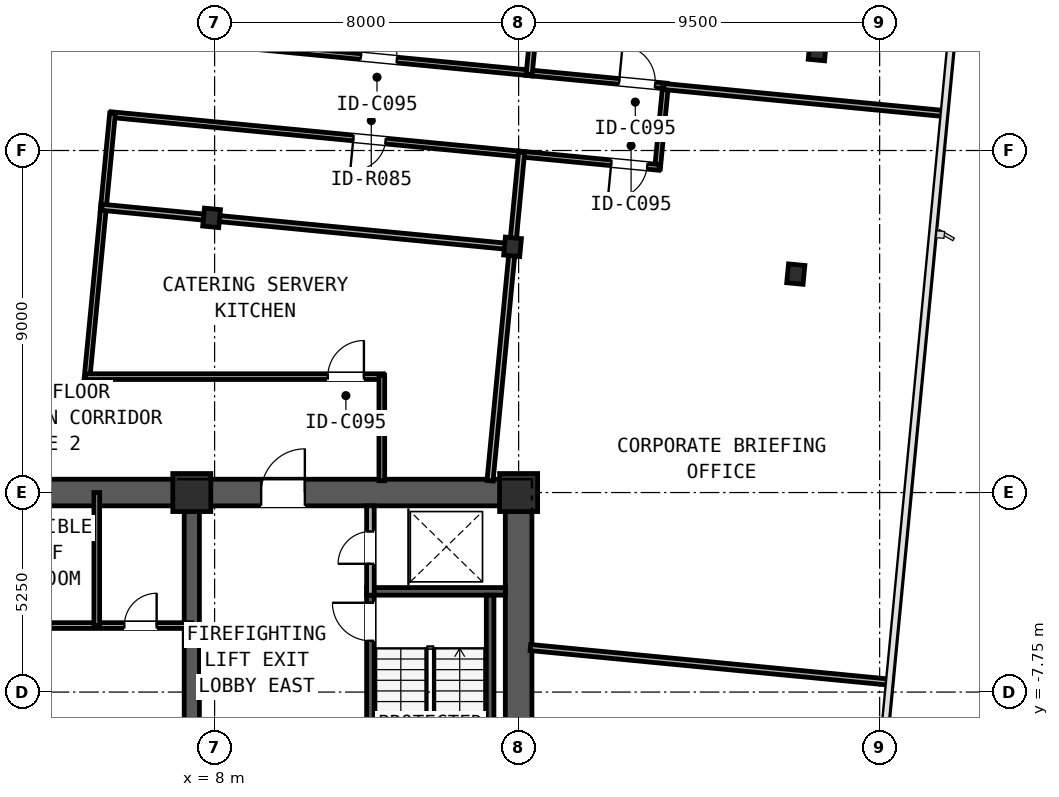
"""IFC4 building model, lengths in metres.
Left out: names, types, materials, properties, quantities, classifications, styles, units other than length and angle.
Written with IfcOpenShell. Run it as: python <this file> out.ifc"""

import sys

from ifc_helpers import new_model, si_unit, direction, frame, frame_2d, origin, origin_2d, place, context, subcontext, project, spatial, rectangle, i_section, extrude, element, fill, save


model = new_model("IFC4")
c1 = context("Model", 3, precision=1e-05, world=origin(), true_north=direction((0.0, 1.0)))
c2 = subcontext(c1, "Body", "Model", "MODEL_VIEW")
j1 = project(units=[si_unit("LENGTHUNIT", "METRE"), si_unit("PLANEANGLEUNIT", "RADIAN")], contexts=[c1])
p1 = place(None, origin())
s1 = spatial("IfcSite", under=j1, at=p1, CompositionType="ELEMENT")
p2 = place(p1, origin())
s2 = spatial("IfcBuilding", under=s1, at=p2, CompositionType="ELEMENT")
p3 = place(p2, frame((0.0, 0.0, 166.95)))
s3 = spatial("IfcBuildingStorey", under=s2, at=p3, CompositionType="ELEMENT", Elevation=166.95)
p4 = place(p3, frame((-16.35, -2.5, 0.0), z_axis=(0.0, 0.0, 1.0), x_axis=(1.0, 0.0, 0.0)))
e1 = element("IfcWall", 1, at=p4, inside=s3, PredefinedType="SHEAR", context=c2, shape_type="SweptSolid", body=[
    extrude(rectangle(XDim=32.7, YDim=0.7, at=frame_2d((16.35, 0.0))), origin(), (0.0, 0.0, 1.0), 2.91),
])
p5 = place(p4, frame((5.975, 0.0, 0.0)))
e2 = element("IfcOpeningElement", 2, at=p5, cuts=e1, PredefinedType="OPENING", context=c2, shape_type="SweptSolid", body=[
    extrude(rectangle(XDim=1.15, YDim=2.0, at=frame_2d((0.575, 1.0))), frame((0.0, 0.36, 0.0), z_axis=(0.0, -1.0, 0.0), x_axis=(1.0, 0.0, 0.0)), (0.0, 0.0, 1.0), 0.72),
])
p6 = place(p4, frame((15.55, 0.0, 0.0)))
e3 = element("IfcOpeningElement", 3, at=p6, cuts=e1, PredefinedType="OPENING", context=c2, shape_type="SweptSolid", body=[
    extrude(rectangle(XDim=1.6, YDim=2.0, at=frame_2d((0.8, 1.0))), frame((0.0, 0.36, 0.0), z_axis=(0.0, -1.0, 0.0), x_axis=(1.0, 0.0, 0.0)), (0.0, 0.0, 1.0), 0.72),
])
p7 = place(p4, frame((25.575, 0.0, 0.0)))
e4 = element("IfcOpeningElement", 4, at=p7, cuts=e1, PredefinedType="OPENING", context=c2, shape_type="SweptSolid", body=[
    extrude(rectangle(XDim=1.15, YDim=2.0, at=frame_2d((0.575, 1.0))), frame((0.0, 0.36, 0.0), z_axis=(0.0, -1.0, 0.0), x_axis=(1.0, 0.0, 0.0)), (0.0, 0.0, 1.0), 0.72),
])
p8 = place(p3, frame((16.0, -12.65, 0.0), z_axis=(0.0, 0.0, 1.0), x_axis=(0.0, 1.0, 0.0)))
e5 = element("IfcWall", 5, at=p8, inside=s3, PredefinedType="SHEAR", context=c2, shape_type="SweptSolid", body=[
    extrude(rectangle(XDim=9.8, YDim=0.7, at=frame_2d((4.9, 0.0))), origin(), (0.0, 0.0, 1.0), 2.91),
])
p9 = place(p3, frame((7.4, -12.65, 0.0), z_axis=(0.0, 0.0, 1.0), x_axis=(0.0, 1.0, 0.0)))
e6 = element("IfcWall", 6, at=p9, inside=s3, PredefinedType="SHEAR", context=c2, shape_type="SweptSolid", body=[
    extrude(rectangle(XDim=9.8, YDim=0.4, at=frame_2d((4.9, 0.0))), origin(), (0.0, 0.0, 1.0), 3.19),
])
p10 = place(p3, frame((12.0, -5.1, 0.0), z_axis=(0.0, 0.0, 1.0), x_axis=(1.0, 0.0, 0.0)))
e7 = element("IfcWall", 7, at=p10, inside=s3, PredefinedType="SOLIDWALL", context=c2, shape_type="SweptSolid", body=[
    extrude(rectangle(XDim=3.65, YDim=0.2, at=frame_2d((1.825, 0.0))), origin(), (0.0, 0.0, 1.0), 3.19),
])
p11 = place(p3, frame((12.1, -12.2, 0.0), z_axis=(0.0, 0.0, 1.0), x_axis=(0.0, 1.0, 0.0)))
e8 = element("IfcWall", 8, at=p11, inside=s3, PredefinedType="SOLIDWALL", context=c2, shape_type="SweptSolid", body=[
    extrude(rectangle(XDim=7.0, YDim=0.2, at=frame_2d((3.5, 0.0))), origin(), (0.0, 0.0, 1.0), 3.19),
])
p12 = place(p11, frame((5.8, 0.0, 0.0)))
e9 = element("IfcOpeningElement", 9, at=p12, cuts=e8, PredefinedType="OPENING", context=c2, shape_type="SweptSolid", body=[
    extrude(rectangle(XDim=1.0, YDim=2.1, at=frame_2d((0.5, 1.05))), frame((0.0, 0.11, 0.0), z_axis=(0.0, -1.0, 0.0), x_axis=(1.0, 0.0, 0.0)), (0.0, 0.0, 1.0), 0.22),
])
p13 = place(p3, frame((15.25, -12.2, 0.0), z_axis=(0.0, 0.0, 1.0), x_axis=(0.0, 1.0, 0.0)))
e10 = element("IfcWall", 10, at=p13, inside=s3, PredefinedType="SOLIDWALL", context=c2, shape_type="SweptSolid", body=[
    extrude(rectangle(XDim=7.0, YDim=0.2, at=frame_2d((3.5, 0.0))), origin(), (0.0, 0.0, 1.0), 3.19),
])
for number, where, z_axis, x_axis in (
    (11, (7.4, -2.5, 0.0), (0.0, 0.0, 1.0), (1.0, 0.0, 0.0)),
    (12, (16.0, -2.5, 0.0), (0.0, 0.0, 1.0), (1.0, 0.0, 0.0)),
):
    element("IfcColumn", number, at=place(p3, frame(where, z_axis=z_axis, x_axis=x_axis)), inside=s3, PredefinedType="COLUMN", context=c2, shape_type="SweptSolid", body=[
        extrude(rectangle(XDim=1.0, YDim=1.0, at=origin_2d()), origin(), (0.0, 0.0, 1.0), 3.45),
    ])
for number, where, z_axis, x_axis in (
    (13, (7.921, 4.728, 0.0), (0.0, 0.0, 1.0), (0.995, -0.096, 0.0)),
    (14, (15.84, 3.965, 0.0), (0.0, 0.0, 1.0), (0.995, -0.096, 0.0)),
):
    element("IfcColumn", number, at=place(p3, frame(where, z_axis=z_axis, x_axis=x_axis)), inside=s3, PredefinedType="COLUMN", context=c2, shape_type="SweptSolid", body=[
        extrude(i_section(OverallWidth=0.424, OverallDepth=0.474, WebThickness=0.048, FlangeThickness=0.077, FilletRadius=0.031, at=origin_2d()), origin(), (0.0, 0.0, 1.0), 3.45),
    ])
for number, where, z_axis, x_axis in (
    (15, (23.293, 3.248, 0.0), (0.0, 0.0, 1.0), (0.995, -0.096, 0.0)),
    (16, (23.86, 9.128, 0.0), (0.0, 0.0, 1.0), (0.995, -0.096, 0.0)),
):
    element("IfcColumn", number, at=place(p3, frame(where, z_axis=z_axis, x_axis=x_axis)), inside=s3, PredefinedType="COLUMN", context=c2, shape_type="SweptSolid", body=[
        extrude(i_section(OverallWidth=0.432, OverallDepth=0.498, WebThickness=0.056, FlangeThickness=0.089, FilletRadius=0.031, at=origin_2d()), origin(), (0.0, 0.0, 1.0), 3.45),
    ])
p14 = place(p3, frame((12.1, -5.2, 0.0), z_axis=(0.0, 0.0, 1.0), x_axis=(0.0, 1.0, 0.0)))
e17 = element("IfcWall", 17, at=p14, inside=s3, PredefinedType="PARTITIONING", context=c2, shape_type="SweptSolid", body=[
    extrude(rectangle(XDim=2.35, YDim=0.2, at=frame_2d((1.175, 0.0))), origin(), (0.0, 0.0, 1.0), 2.225),
])
p15 = place(p14, frame((0.825, 0.0, 0.0)))
e18 = element("IfcOpeningElement", 18, at=p15, cuts=e17, PredefinedType="OPENING", context=c2, shape_type="SweptSolid", body=[
    extrude(rectangle(XDim=0.85, YDim=2.05, at=frame_2d((0.425, 1.025))), frame((0.0, 0.11, 0.0), z_axis=(0.0, -1.0, 0.0), x_axis=(1.0, 0.0, 0.0)), (0.0, 0.0, 1.0), 0.22),
])
p16 = place(p3, frame((1.6, -6.0, 0.0), z_axis=(0.0, 0.0, 1.0), x_axis=(1.0, 0.0, 0.0)))
e19 = element("IfcWall", 19, at=p16, inside=s3, PredefinedType="PARTITIONING", context=c2, shape_type="SweptSolid", body=[
    extrude(rectangle(XDim=5.8, YDim=0.15, at=frame_2d((2.9, 0.0))), origin(), (0.0, 0.0, 1.0), 3.19),
])
p17 = place(p16, frame((1.2, 0.0, 0.0)))
e20 = element("IfcOpeningElement", 20, at=p17, cuts=e19, PredefinedType="OPENING", context=c2, shape_type="SweptSolid", body=[
    extrude(rectangle(XDim=0.9, YDim=2.1, at=frame_2d((0.45, 1.05))), frame((0.0, 0.085, 0.0), z_axis=(0.0, -1.0, 0.0), x_axis=(1.0, 0.0, 0.0)), (0.0, 0.0, 1.0), 0.17),
])
p18 = place(p16, frame((4.025, 0.0, 0.0)))
e21 = element("IfcOpeningElement", 21, at=p18, cuts=e19, PredefinedType="OPENING", context=c2, shape_type="SweptSolid", body=[
    extrude(rectangle(XDim=0.85, YDim=2.05, at=frame_2d((0.425, 1.025))), frame((0.0, 0.085, 0.0), z_axis=(0.0, -1.0, 0.0), x_axis=(1.0, 0.0, 0.0)), (0.0, 0.0, 1.0), 0.17),
])
p19 = place(p3, frame((4.9, -6.0, 0.0), z_axis=(0.0, 0.0, 1.0), x_axis=(0.0, 1.0, 0.0)))
e22 = element("IfcWall", 22, at=p19, inside=s3, PredefinedType="PARTITIONING", context=c2, shape_type="SweptSolid", body=[
    extrude(rectangle(XDim=3.5, YDim=0.15, at=frame_2d((1.75, 0.0))), origin(), (0.0, 0.0, 1.0), 2.225),
])
p20 = place(p3, frame((8.28, 9.314, 0.0), z_axis=(0.0, 0.0, 1.0), x_axis=(0.995395467524, -0.095853342309, 0.0)))
e23 = element("IfcWall", 23, at=p20, inside=s3, PredefinedType="PARTITIONING", context=c2, shape_type="SweptSolid", body=[
    extrude(rectangle(XDim=8.12, YDim=0.15, at=frame_2d((4.06, 0.0))), origin(), (0.0, 0.0, 1.0), 2.479),
])
p21 = place(p20, frame((3.585, 0.0, 0.0)))
e24 = element("IfcOpeningElement", 24, at=p21, cuts=e23, PredefinedType="OPENING", context=c2, shape_type="SweptSolid", body=[
    extrude(rectangle(XDim=0.95, YDim=2.15, at=frame_2d((0.475, 1.075))), frame((0.0, 0.085, 0.0), z_axis=(0.0, -1.0, 0.0), x_axis=(1.0, 0.0, 0.0)), (0.0, 0.0, 1.0), 0.17),
])
p22 = place(p3, frame((16.199, 8.552, 0.0), z_axis=(0.0, 0.0, 1.0), x_axis=(0.995391104887, -0.095898635608, 0.0)))
e25 = element("IfcWall", 25, at=p22, inside=s3, PredefinedType="PARTITIONING", context=c2, shape_type="SweptSolid", body=[
    extrude(rectangle(XDim=3.722, YDim=0.15, at=frame_2d((1.861, 0.0))), origin(), (0.0, 0.0, 1.0), 2.479),
])
p23 = place(p22, frame((2.457, 0.0, 0.0)))
e26 = element("IfcOpeningElement", 26, at=p23, cuts=e25, PredefinedType="OPENING", context=c2, shape_type="SweptSolid", body=[
    extrude(rectangle(XDim=0.95, YDim=2.15, at=frame_2d((0.475, 1.075))), frame((0.0, 0.085, 0.0), z_axis=(0.0, -1.0, 0.0), x_axis=(1.0, 0.0, 0.0)), (0.0, 0.0, 1.0), 0.17),
])
p24 = place(p3, frame((16.156, 6.396, 0.0), z_axis=(0.0, 0.0, 1.0), x_axis=(-0.99539478422, 0.095860437863, 0.0)))
e27 = element("IfcWall", 27, at=p24, inside=s3, PredefinedType="PARTITIONING", context=c2, shape_type="SweptSolid", body=[
    extrude(rectangle(XDim=10.936, YDim=0.15, at=frame_2d((5.468, 0.0))), origin(), (0.0, 0.0, 1.0), 2.479),
])
p25 = place(p24, frame((3.675, 0.0, 0.0)))
e28 = element("IfcOpeningElement", 28, at=p25, cuts=e27, PredefinedType="OPENING", context=c2, shape_type="SweptSolid", body=[
    extrude(rectangle(XDim=0.85, YDim=2.05, at=frame_2d((0.425, 1.025))), frame((0.0, 0.085, 0.0), z_axis=(0.0, -1.0, 0.0), x_axis=(1.0, 0.0, 0.0)), (0.0, 0.0, 1.0), 0.17),
])
p26 = place(p3, frame((5.314, 7.48, 0.0), z_axis=(0.0, 0.0, 1.0), x_axis=(-0.09587519517, -0.995393362923, 0.0)))
e29 = element("IfcWall", 29, at=p26, inside=s3, PredefinedType="PARTITIONING", context=c2, shape_type="SweptSolid", body=[
    extrude(rectangle(XDim=2.572, YDim=0.15, at=frame_2d((1.286, 0.0))), origin(), (0.0, 0.0, 1.0), 2.479),
])
p27 = place(p3, frame((5.084, 5.083, 0.0), z_axis=(0.0, 0.0, 1.0), x_axis=(-0.095867331855, -0.995394120277, 0.0)))
e30 = element("IfcWall", 30, at=p27, inside=s3, PredefinedType="PARTITIONING", context=c2, shape_type="SweptSolid", body=[
    extrude(rectangle(XDim=4.594, YDim=0.15, at=frame_2d((2.297, 0.0))), origin(), (0.0, 0.0, 1.0), 2.479),
])
p28 = place(p3, frame((4.607, 0.55, 0.0), z_axis=(0.0, 0.0, 1.0), x_axis=(1.0, 0.0, 0.0)))
e31 = element("IfcWall", 31, at=p28, inside=s3, PredefinedType="PARTITIONING", context=c2, shape_type="SweptSolid", body=[
    extrude(rectangle(XDim=7.833, YDim=0.15, at=frame_2d((3.917, 0.0))), origin(), (0.0, 0.0, 1.0), 2.479),
])
p29 = place(p28, frame((6.372, 0.0, 0.0)))
e32 = element("IfcOpeningElement", 32, at=p29, cuts=e31, PredefinedType="OPENING", context=c2, shape_type="SweptSolid", body=[
    extrude(rectangle(XDim=0.95, YDim=2.15, at=frame_2d((0.475, 1.075))), frame((0.0, 0.085, 0.0), z_axis=(0.0, -1.0, 0.0), x_axis=(1.0, 0.0, 0.0)), (0.0, 0.0, 1.0), 0.17),
])
p30 = place(p3, frame((12.4, 0.59, 0.0), z_axis=(0.0, 0.0, 1.0), x_axis=(0.0, -1.0, 0.0)))
e33 = element("IfcWall", 33, at=p30, inside=s3, PredefinedType="PARTITIONING", context=c2, shape_type="SweptSolid", body=[
    extrude(rectangle(XDim=2.78, YDim=0.15, at=frame_2d((1.39, 0.0))), origin(), (0.0, 0.0, 1.0), 2.225),
])
p31 = place(p3, frame((19.866, 8.219, 0.0), z_axis=(0.0, 0.0, 1.0), x_axis=(-0.095773447772, -0.995403157872, 0.0)))
e34 = element("IfcWall", 34, at=p31, inside=s3, PredefinedType="PARTITIONING", context=c2, shape_type="SweptSolid", body=[
    extrude(rectangle(XDim=2.21, YDim=0.15, at=frame_2d((1.105, 0.0))), origin(), (0.0, 0.0, 1.0), 2.718),
])
p32 = place(p3, frame((19.698, 6.055, 0.0), z_axis=(0.0, 0.0, 1.0), x_axis=(-0.995397364202, 0.095833644092, 0.0)))
e35 = element("IfcWall", 35, at=p32, inside=s3, PredefinedType="PARTITIONING", context=c2, shape_type="SweptSolid", body=[
    extrude(rectangle(XDim=3.722, YDim=0.15, at=frame_2d((1.861, 0.0))), origin(), (0.0, 0.0, 1.0), 2.479),
])
p33 = place(p32, frame((0.315, 0.0, 0.0)))
e36 = element("IfcOpeningElement", 36, at=p33, cuts=e35, PredefinedType="OPENING", context=c2, shape_type="SweptSolid", body=[
    extrude(rectangle(XDim=0.95, YDim=2.15, at=frame_2d((0.475, 1.075))), frame((0.0, 0.085, 0.0), z_axis=(0.0, -1.0, 0.0), x_axis=(1.0, 0.0, 0.0)), (0.0, 0.0, 1.0), 0.17),
])
p34 = place(p3, frame((16.389, 9.671, 0.0), z_axis=(0.0, 0.0, 1.0), x_axis=(-0.095811626391, -0.995399483749, 0.0)))
e37 = element("IfcWall", 37, at=p34, inside=s3, PredefinedType="PARTITIONING", context=c2, shape_type="SweptSolid", body=[
    extrude(rectangle(XDim=1.172, YDim=0.16, at=frame_2d((0.586, 0.0))), origin(), (0.0, 0.0, 1.0), 2.479),
])
p35 = place(p3, frame((27.236, 7.469, 0.0), z_axis=(0.0, 0.0, 1.0), x_axis=(-0.995396228159, 0.095845443117, 0.0)))
e38 = element("IfcWall", 38, at=p35, inside=s3, PredefinedType="PARTITIONING", context=c2, shape_type="SweptSolid", body=[
    extrude(rectangle(XDim=7.448, YDim=0.16, at=frame_2d((3.724, 0.0))), origin(), (0.0, 0.0, 1.0), 2.558),
])
p36 = place(p3, frame((7.745, 4.745, 0.0), z_axis=(0.0, 0.0, 1.0), x_axis=(-0.995392910691, 0.095879890208, 0.0)))
e39 = element("IfcWall", 39, at=p36, inside=s3, PredefinedType="PARTITIONING", context=c2, shape_type="SweptSolid", body=[
    extrude(rectangle(XDim=2.722, YDim=0.16, at=frame_2d((1.361, 0.0))), origin(), (0.0, 0.0, 1.0), 2.479),
])
p37 = place(p3, frame((15.665, 3.982, 0.0), z_axis=(0.0, 0.0, 1.0), x_axis=(-0.995396667246, 0.095840882902, 0.0)))
e40 = element("IfcWall", 40, at=p37, inside=s3, PredefinedType="PARTITIONING", context=c2, shape_type="SweptSolid", body=[
    extrude(rectangle(XDim=7.604, YDim=0.16, at=frame_2d((3.802, 0.0))), origin(), (0.0, 0.0, 1.0), 2.479),
])
p38 = place(p3, frame((16.079, 6.444, 0.0), z_axis=(0.0, 0.0, 1.0), x_axis=(-0.095794827695, -0.995401100555, 0.0)))
e41 = element("IfcWall", 41, at=p38, inside=s3, PredefinedType="PARTITIONING", context=c2, shape_type="SweptSolid", body=[
    extrude(rectangle(XDim=2.314, YDim=0.16, at=frame_2d((1.157, 0.0))), origin(), (0.0, 0.0, 1.0), 2.479),
])
p39 = place(p3, frame((15.823, 3.79, 0.0), z_axis=(0.0, 0.0, 1.0), x_axis=(-0.095865726078, -0.99539427493, 0.0)))
e42 = element("IfcWall", 42, at=p39, inside=s3, PredefinedType="PARTITIONING", context=c2, shape_type="SweptSolid", body=[
    extrude(rectangle(XDim=6.008, YDim=0.16, at=frame_2d((3.004, 0.0))), origin(), (0.0, 0.0, 1.0), 2.225),
])
p40 = place(p3, frame((25.796, -7.492, 0.0), z_axis=(0.0, 0.0, 1.0), x_axis=(-0.995396487733, 0.095842747294, 0.0)))
e43 = element("IfcWall", 43, at=p40, inside=s3, PredefinedType="PARTITIONING", context=c2, shape_type="SweptSolid", body=[
    extrude(rectangle(XDim=9.53, YDim=0.16, at=frame_2d((4.765, 0.0))), origin(), (0.0, 0.0, 1.0), 2.225),
])
p41 = place(p12, origin())
e44 = element("IfcDoor", 44, at=p41, inside=s3, OperationType="SINGLE_SWING_RIGHT", PredefinedType="DOOR", context=c2, shape_type="SweptSolid", body=[
    extrude(rectangle(XDim=1.0, YDim=2.1, at=frame_2d((0.5, 1.05))), frame((0.0, 0.025, 0.0), z_axis=(0.0, -1.0, 0.0), x_axis=(1.0, 0.0, 0.0)), (0.0, 0.0, 1.0), 0.05),
])
fill(e9, e44)
p42 = place(p15, frame((0.85, 0.0, 0.0), z_axis=(0.0, 0.0, 1.0), x_axis=(-1.0, 0.0, 0.0)))
e45 = element("IfcDoor", 45, at=p42, inside=s3, OperationType="SINGLE_SWING_LEFT", PredefinedType="DOOR", context=c2, shape_type="SweptSolid", body=[
    extrude(rectangle(XDim=0.85, YDim=2.05, at=frame_2d((0.425, 1.025))), frame((0.0, 0.025, 0.0), z_axis=(0.0, -1.0, 0.0), x_axis=(1.0, 0.0, 0.0)), (0.0, 0.0, 1.0), 0.05),
])
fill(e18, e45)
p43 = place(p7, origin())
e46 = element("IfcDoor", 46, at=p43, inside=s3, OperationType="SINGLE_SWING_RIGHT", PredefinedType="DOOR", context=c2, shape_type="SweptSolid", body=[
    extrude(rectangle(XDim=1.15, YDim=2.0, at=frame_2d((0.575, 1.0))), frame((0.0, 0.025, 0.0), z_axis=(0.0, -1.0, 0.0), x_axis=(1.0, 0.0, 0.0)), (0.0, 0.0, 1.0), 0.05),
])
fill(e4, e46)
p44 = place(p18, frame((0.85, 0.0, 0.0), z_axis=(0.0, 0.0, 1.0), x_axis=(-1.0, 0.0, 0.0)))
e47 = element("IfcDoor", 47, at=p44, inside=s3, OperationType="SINGLE_SWING_RIGHT", PredefinedType="DOOR", context=c2, shape_type="SweptSolid", body=[
    extrude(rectangle(XDim=0.85, YDim=2.05, at=frame_2d((0.425, 1.025))), frame((0.0, 0.025, 0.0), z_axis=(0.0, -1.0, 0.0), x_axis=(1.0, 0.0, 0.0)), (0.0, 0.0, 1.0), 0.05),
])
fill(e21, e47)
p45 = place(p21, frame((0.95, 0.0, 0.0), z_axis=(0.0, 0.0, 1.0), x_axis=(-1.0, 0.0, 0.0)))
e48 = element("IfcDoor", 48, at=p45, inside=s3, OperationType="SINGLE_SWING_LEFT", PredefinedType="DOOR", context=c2, shape_type="SweptSolid", body=[
    extrude(rectangle(XDim=0.95, YDim=2.15, at=frame_2d((0.475, 1.075))), frame((0.0, 0.025, 0.0), z_axis=(0.0, -1.0, 0.0), x_axis=(1.0, 0.0, 0.0)), (0.0, 0.0, 1.0), 0.05),
])
fill(e24, e48)
p46 = place(p23, frame((0.95, 0.0, 0.0), z_axis=(0.0, 0.0, 1.0), x_axis=(-1.0, 0.0, 0.0)))
e49 = element("IfcDoor", 49, at=p46, inside=s3, OperationType="SINGLE_SWING_LEFT", PredefinedType="DOOR", context=c2, shape_type="SweptSolid", body=[
    extrude(rectangle(XDim=0.95, YDim=2.15, at=frame_2d((0.475, 1.075))), frame((0.0, 0.025, 0.0), z_axis=(0.0, -1.0, 0.0), x_axis=(1.0, 0.0, 0.0)), (0.0, 0.0, 1.0), 0.05),
])
fill(e26, e49)
p47 = place(p25, frame((0.85, 0.0, 0.0), z_axis=(0.0, 0.0, 1.0), x_axis=(-1.0, 0.0, 0.0)))
e50 = element("IfcDoor", 50, at=p47, inside=s3, OperationType="SINGLE_SWING_RIGHT", PredefinedType="DOOR", context=c2, shape_type="SweptSolid", body=[
    extrude(rectangle(XDim=0.85, YDim=2.05, at=frame_2d((0.425, 1.025))), frame((0.0, 0.025, 0.0), z_axis=(0.0, -1.0, 0.0), x_axis=(1.0, 0.0, 0.0)), (0.0, 0.0, 1.0), 0.05),
])
fill(e28, e50)
p48 = place(p29, origin())
e51 = element("IfcDoor", 51, at=p48, inside=s3, OperationType="SINGLE_SWING_RIGHT", PredefinedType="DOOR", context=c2, shape_type="SweptSolid", body=[
    extrude(rectangle(XDim=0.95, YDim=2.15, at=frame_2d((0.475, 1.075))), frame((0.0, 0.025, 0.0), z_axis=(0.0, -1.0, 0.0), x_axis=(1.0, 0.0, 0.0)), (0.0, 0.0, 1.0), 0.05),
])
fill(e32, e51)
p49 = place(p33, frame((0.95, 0.0, 0.0), z_axis=(0.0, 0.0, 1.0), x_axis=(-1.0, 0.0, 0.0)))
e52 = element("IfcDoor", 52, at=p49, inside=s3, OperationType="SINGLE_SWING_RIGHT", PredefinedType="DOOR", context=c2, shape_type="SweptSolid", body=[
    extrude(rectangle(XDim=0.95, YDim=2.15, at=frame_2d((0.475, 1.075))), frame((0.0, 0.025, 0.0), z_axis=(0.0, -1.0, 0.0), x_axis=(1.0, 0.0, 0.0)), (0.0, 0.0, 1.0), 0.05),
])
fill(e36, e52)
save(model, sys.argv[1])
